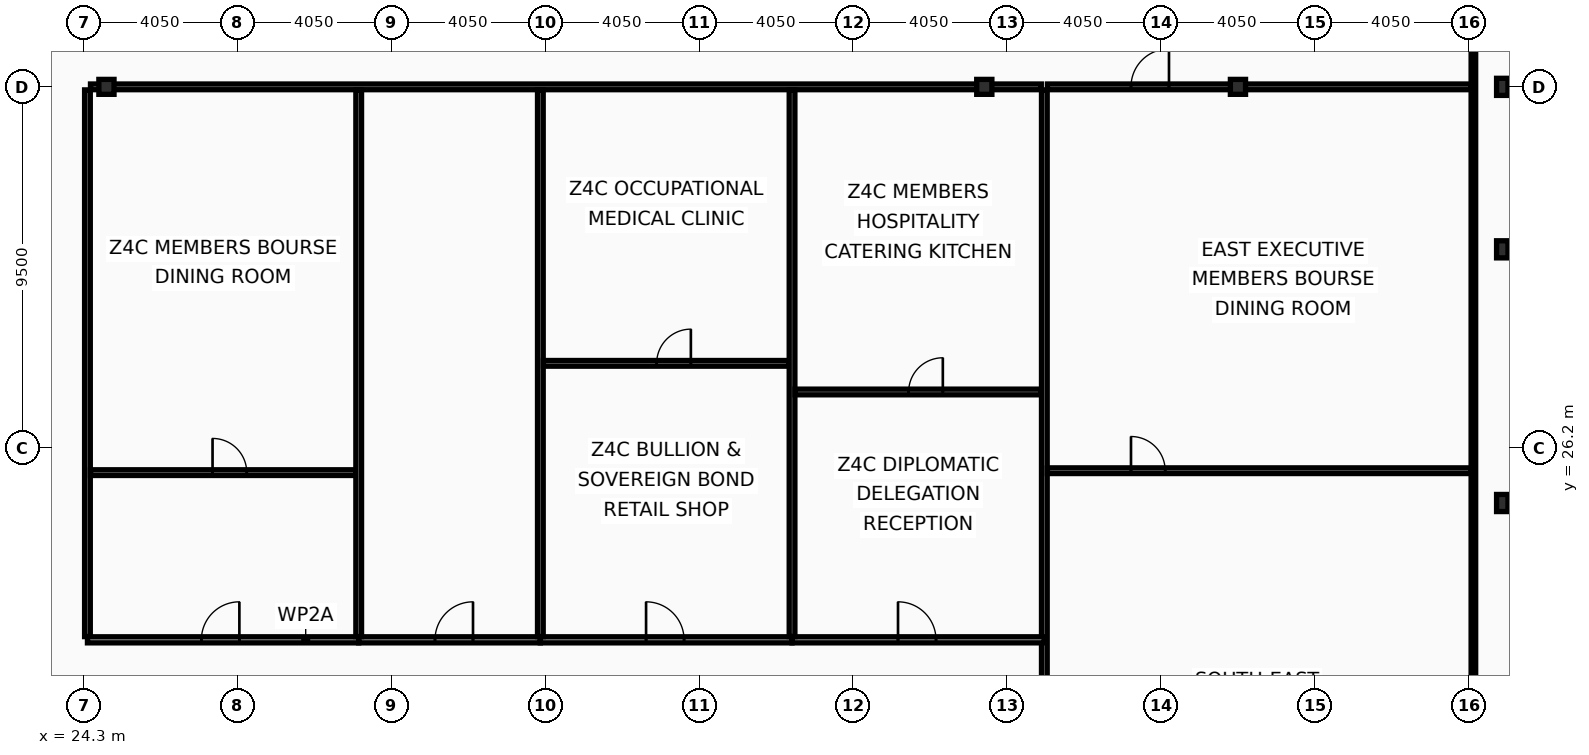
"""IFC4 building model, lengths in metres.
Left out: names, types, materials, properties, quantities, classifications, styles, units other than length and angle.
Written with IfcOpenShell. Run it as: python <this file> out.ifc"""

import sys

from ifc_helpers import new_model, si_unit, direction, frame, frame_2d, origin, origin_2d, place, context, subcontext, project, spatial, rectangle, i_section, extrude, element, fill, save


model = new_model("IFC4")
c1 = context("Model", 3, precision=1e-05, world=origin(), true_north=direction((0.0, 1.0)))
c2 = subcontext(c1, "Body", "Model", "MODEL_VIEW")
j1 = project(units=[si_unit("LENGTHUNIT", "METRE"), si_unit("PLANEANGLEUNIT", "RADIAN")], contexts=[c1])
p1 = place(None, origin())
s1 = spatial("IfcSite", under=j1, at=p1, CompositionType="ELEMENT")
p2 = place(p1, origin())
s2 = spatial("IfcBuilding", under=s1, at=p2, CompositionType="ELEMENT")
p3 = place(p2, frame((0.0, 0.0, 298.6)))
s3 = spatial("IfcBuildingStorey", under=s2, at=p3, CompositionType="ELEMENT", Elevation=298.6)
for number, where, z_axis, x_axis in (
    (1, (61.63, 24.75, 0.0), (0.0, 0.0, 1.0), (1.0, 0.0, 0.0)),
    (2, (61.63, 31.425, 0.0), (0.0, 0.0, 1.0), (1.0, 0.0, 0.0)),
    (3, (61.63, 35.7, 0.0), (0.0, 0.0, 1.0), (1.0, 0.0, 0.0)),
):
    element("IfcColumn", number, at=place(p3, frame(where, z_axis=z_axis, x_axis=x_axis)), inside=s3, PredefinedType="COLUMN", context=c2, shape_type="SweptSolid", body=[
        extrude(i_section(OverallWidth=0.3, OverallDepth=0.45, WebThickness=0.014, FlangeThickness=0.026, at=origin_2d()), origin(), (0.0, 0.0, 1.0), 3.6),
    ])
for number, where, z_axis, x_axis in (
    (4, (24.9, 35.7, 0.0), (0.0, 0.0, 1.0), (1.0, 0.0, 0.0)),
    (5, (48.0, 35.7, 0.0), (0.0, 0.0, 1.0), (1.0, 0.0, 0.0)),
    (6, (54.675, 35.7, 0.0), (0.0, 0.0, 1.0), (1.0, 0.0, 0.0)),
):
    element("IfcColumn", number, at=place(p3, frame(where, z_axis=z_axis, x_axis=x_axis)), inside=s3, PredefinedType="COLUMN", context=c2, shape_type="SweptSolid", body=[
        extrude(i_section(OverallWidth=0.399, OverallDepth=0.393, WebThickness=0.023, FlangeThickness=0.037, at=origin_2d()), origin(), (0.0, 0.0, 1.0), 3.6),
    ])
p4 = place(p3, frame((24.4, 21.235, 0.0), z_axis=(0.0, 0.0, 1.0), x_axis=(0.0, 1.0, 0.0)))
e7 = element("IfcWall", 7, at=p4, inside=s3, PredefinedType="PARTITIONING", context=c2, shape_type="SweptSolid", body=[
    extrude(rectangle(XDim=14.385, YDim=0.15, at=frame_2d((7.192, 0.0))), origin(), (0.0, 0.0, 1.0), 2.78),
])
p5 = place(p3, frame((49.58, 10.665, 0.0), z_axis=(0.0, 0.0, 1.0), x_axis=(0.0, 1.0, 0.0)))
e8 = element("IfcWall", 8, at=p5, inside=s3, PredefinedType="PARTITIONING", context=c2, shape_type="SweptSolid", body=[
    extrude(rectangle(XDim=24.955, YDim=0.15, at=frame_2d((12.478, 0.0))), origin(), (0.0, 0.0, 1.0), 3.03),
])
p6 = place(p5, frame((3.2, 0.0, 0.0)))
e9 = element("IfcOpeningElement", 9, at=p6, cuts=e8, PredefinedType="OPENING", context=c2, shape_type="SweptSolid", body=[
    extrude(rectangle(XDim=1.1, YDim=2.1, at=frame_2d((0.55, 1.05))), frame((0.0, 0.085, 0.0), z_axis=(0.0, -1.0, 0.0), x_axis=(1.0, 0.0, 0.0)), (0.0, 0.0, 1.0), 0.17),
])
p7 = place(p3, frame((24.48, 35.7, 0.0), z_axis=(0.0, 0.0, 1.0), x_axis=(1.0, 0.0, 0.0)))
e10 = element("IfcWall", 10, at=p7, inside=s3, PredefinedType="PARTITIONING", context=c2, shape_type="SweptSolid", body=[
    extrude(rectangle(XDim=25.02, YDim=0.15, at=frame_2d((12.51, 0.0))), origin(), (0.0, 0.0, 1.0), 2.78),
])
p8 = place(p3, frame((49.66, 35.7, 0.0), z_axis=(0.0, 0.0, 1.0), x_axis=(1.0, 0.0, 0.0)))
e11 = element("IfcWall", 11, at=p8, inside=s3, PredefinedType="PARTITIONING", context=c2, shape_type="SweptSolid", body=[
    extrude(rectangle(XDim=11.145, YDim=0.15, at=frame_2d((5.573, 0.0))), origin(), (0.0, 0.0, 1.0), 2.78),
])
p9 = place(p8, frame((2.2, 0.0, 0.0)))
e12 = element("IfcOpeningElement", 12, at=p9, cuts=e11, PredefinedType="OPENING", context=c2, shape_type="SweptSolid", body=[
    extrude(rectangle(XDim=1.0, YDim=2.05, at=frame_2d((0.5, 1.025))), frame((0.0, 0.085, 0.0), z_axis=(0.0, -1.0, 0.0), x_axis=(1.0, 0.0, 0.0)), (0.0, 0.0, 1.0), 0.17),
])
p10 = place(p3, frame((49.66, 25.6, 0.0), z_axis=(0.0, 0.0, 1.0), x_axis=(1.0, 0.0, 0.0)))
e13 = element("IfcWall", 13, at=p10, inside=s3, PredefinedType="PARTITIONING", context=c2, shape_type="SweptSolid", body=[
    extrude(rectangle(XDim=11.145, YDim=0.15, at=frame_2d((5.573, 0.0))), origin(), (0.0, 0.0, 1.0), 2.78),
])
p11 = place(p10, frame((2.2, 0.0, 0.0)))
e14 = element("IfcOpeningElement", 14, at=p11, cuts=e13, PredefinedType="OPENING", context=c2, shape_type="SweptSolid", body=[
    extrude(rectangle(XDim=0.9, YDim=2.05, at=frame_2d((0.45, 1.025))), frame((0.0, 0.085, 0.0), z_axis=(0.0, -1.0, 0.0), x_axis=(1.0, 0.0, 0.0)), (0.0, 0.0, 1.0), 0.17),
])
p12 = place(p3, frame((24.4, 21.15, 0.0), z_axis=(0.0, 0.0, 1.0), x_axis=(1.0, 0.0, 0.0)))
e15 = element("IfcWall", 15, at=p12, inside=s3, PredefinedType="PARTITIONING", context=c2, shape_type="SweptSolid", body=[
    extrude(rectangle(XDim=7.138, YDim=0.16, at=frame_2d((3.569, 0.0))), origin(), (0.0, 0.0, 1.0), 2.78),
])
p13 = place(p12, frame((2.998, 0.0, 0.0)))
e16 = element("IfcOpeningElement", 16, at=p13, cuts=e15, PredefinedType="OPENING", context=c2, shape_type="SweptSolid", body=[
    extrude(rectangle(XDim=1.0, YDim=2.05, at=frame_2d((0.5, 1.025))), frame((0.0, 0.09, 0.0), z_axis=(0.0, -1.0, 0.0), x_axis=(1.0, 0.0, 0.0)), (0.0, 0.0, 1.0), 0.18),
])
p14 = place(p3, frame((24.48, 25.55, 0.0), z_axis=(0.0, 0.0, 1.0), x_axis=(1.0, 0.0, 0.0)))
e17 = element("IfcWall", 17, at=p14, inside=s3, PredefinedType="PARTITIONING", context=c2, shape_type="SweptSolid", body=[
    extrude(rectangle(XDim=6.978, YDim=0.15, at=frame_2d((3.489, 0.0))), origin(), (0.0, 0.0, 1.0), 2.78),
])
p15 = place(p14, frame((3.212, 0.0, 0.0)))
e18 = element("IfcOpeningElement", 18, at=p15, cuts=e17, PredefinedType="OPENING", context=c2, shape_type="SweptSolid", body=[
    extrude(rectangle(XDim=0.9, YDim=2.05, at=frame_2d((0.45, 1.025))), frame((0.0, 0.085, 0.0), z_axis=(0.0, -1.0, 0.0), x_axis=(1.0, 0.0, 0.0)), (0.0, 0.0, 1.0), 0.17),
])
p16 = place(p3, frame((31.538, 21.15, 0.0), z_axis=(0.0, 0.0, 1.0), x_axis=(1.0, 0.0, 0.0)))
e19 = element("IfcWall", 19, at=p16, inside=s3, PredefinedType="PARTITIONING", context=c2, shape_type="SweptSolid", body=[
    extrude(rectangle(XDim=4.78, YDim=0.16, at=frame_2d((2.39, 0.0))), origin(), (0.0, 0.0, 1.0), 3.44),
])
p17 = place(p16, frame((2.008, 0.0, 0.0)))
e20 = element("IfcOpeningElement", 20, at=p17, cuts=e19, PredefinedType="OPENING", context=c2, shape_type="SweptSolid", body=[
    extrude(rectangle(XDim=1.0, YDim=2.05, at=frame_2d((0.5, 1.025))), frame((0.0, 0.09, 0.0), z_axis=(0.0, -1.0, 0.0), x_axis=(1.0, 0.0, 0.0)), (0.0, 0.0, 1.0), 0.18),
])
p18 = place(p3, frame((31.538, 21.235, 0.0), z_axis=(0.0, 0.0, 1.0), x_axis=(0.0, 1.0, 0.0)))
e21 = element("IfcWall", 21, at=p18, inside=s3, PredefinedType="PARTITIONING", context=c2, shape_type="SweptSolid", body=[
    extrude(rectangle(XDim=14.385, YDim=0.15, at=frame_2d((7.192, 0.0))), origin(), (0.0, 0.0, 1.0), 3.03),
])
p19 = place(p3, frame((36.318, 21.15, 0.0), z_axis=(0.0, 0.0, 1.0), x_axis=(1.0, 0.0, 0.0)))
e22 = element("IfcWall", 22, at=p19, inside=s3, PredefinedType="PARTITIONING", context=c2, shape_type="SweptSolid", body=[
    extrude(rectangle(XDim=6.623, YDim=0.16, at=frame_2d((3.312, 0.0))), origin(), (0.0, 0.0, 1.0), 2.78),
])
p20 = place(p19, frame((2.782, 0.0, 0.0)))
e23 = element("IfcOpeningElement", 23, at=p20, cuts=e22, PredefinedType="OPENING", context=c2, shape_type="SweptSolid", body=[
    extrude(rectangle(XDim=1.0, YDim=2.05, at=frame_2d((0.5, 1.025))), frame((0.0, 0.09, 0.0), z_axis=(0.0, -1.0, 0.0), x_axis=(1.0, 0.0, 0.0)), (0.0, 0.0, 1.0), 0.18),
])
p21 = place(p3, frame((36.318, 21.235, 0.0), z_axis=(0.0, 0.0, 1.0), x_axis=(0.0, 1.0, 0.0)))
e24 = element("IfcWall", 24, at=p21, inside=s3, PredefinedType="PARTITIONING", context=c2, shape_type="SweptSolid", body=[
    extrude(rectangle(XDim=14.385, YDim=0.15, at=frame_2d((7.192, 0.0))), origin(), (0.0, 0.0, 1.0), 3.03),
])
p22 = place(p3, frame((36.398, 28.425, 0.0), z_axis=(0.0, 0.0, 1.0), x_axis=(1.0, 0.0, 0.0)))
e25 = element("IfcWall", 25, at=p22, inside=s3, PredefinedType="PARTITIONING", context=c2, shape_type="SweptSolid", body=[
    extrude(rectangle(XDim=6.463, YDim=0.15, at=frame_2d((3.231, 0.0))), origin(), (0.0, 0.0, 1.0), 2.78),
])
p23 = place(p22, frame((2.98, 0.0, 0.0)))
e26 = element("IfcOpeningElement", 26, at=p23, cuts=e25, PredefinedType="OPENING", context=c2, shape_type="SweptSolid", body=[
    extrude(rectangle(XDim=0.9, YDim=2.05, at=frame_2d((0.45, 1.025))), frame((0.0, 0.085, 0.0), z_axis=(0.0, -1.0, 0.0), x_axis=(1.0, 0.0, 0.0)), (0.0, 0.0, 1.0), 0.17),
])
p24 = place(p3, frame((42.941, 21.15, 0.0), z_axis=(0.0, 0.0, 1.0), x_axis=(1.0, 0.0, 0.0)))
e27 = element("IfcWall", 27, at=p24, inside=s3, PredefinedType="PARTITIONING", context=c2, shape_type="SweptSolid", body=[
    extrude(rectangle(XDim=6.639, YDim=0.16, at=frame_2d((3.319, 0.0))), origin(), (0.0, 0.0, 1.0), 2.78),
])
p25 = place(p24, frame((2.788, 0.0, 0.0)))
e28 = element("IfcOpeningElement", 28, at=p25, cuts=e27, PredefinedType="OPENING", context=c2, shape_type="SweptSolid", body=[
    extrude(rectangle(XDim=1.0, YDim=2.05, at=frame_2d((0.5, 1.025))), frame((0.0, 0.09, 0.0), z_axis=(0.0, -1.0, 0.0), x_axis=(1.0, 0.0, 0.0)), (0.0, 0.0, 1.0), 0.18),
])
p26 = place(p3, frame((42.941, 21.235, 0.0), z_axis=(0.0, 0.0, 1.0), x_axis=(0.0, 1.0, 0.0)))
e29 = element("IfcWall", 29, at=p26, inside=s3, PredefinedType="PARTITIONING", context=c2, shape_type="SweptSolid", body=[
    extrude(rectangle(XDim=14.385, YDim=0.15, at=frame_2d((7.192, 0.0))), origin(), (0.0, 0.0, 1.0), 2.78),
])
p27 = place(p3, frame((43.021, 27.672, 0.0), z_axis=(0.0, 0.0, 1.0), x_axis=(1.0, 0.0, 0.0)))
e30 = element("IfcWall", 30, at=p27, inside=s3, PredefinedType="PARTITIONING", context=c2, shape_type="SweptSolid", body=[
    extrude(rectangle(XDim=6.479, YDim=0.15, at=frame_2d((3.24, 0.0))), origin(), (0.0, 0.0, 1.0), 2.78),
])
p28 = place(p27, frame((2.988, 0.0, 0.0)))
e31 = element("IfcOpeningElement", 31, at=p28, cuts=e30, PredefinedType="OPENING", context=c2, shape_type="SweptSolid", body=[
    extrude(rectangle(XDim=0.9, YDim=2.05, at=frame_2d((0.45, 1.025))), frame((0.0, 0.085, 0.0), z_axis=(0.0, -1.0, 0.0), x_axis=(1.0, 0.0, 0.0)), (0.0, 0.0, 1.0), 0.17),
])
p29 = place(p3, frame((60.87, 10.665, 0.0), z_axis=(0.0, 0.0, 1.0), x_axis=(0.0, 1.0, 0.0)))
e32 = element("IfcWall", 32, at=p29, inside=s3, PredefinedType="PARTITIONING", context=c2, shape_type="SweptSolid", body=[
    extrude(rectangle(XDim=42.11, YDim=0.12, at=frame_2d((21.055, 0.0))), origin(), (0.0, 0.0, 1.0), 2.78),
])
p30 = place(p9, origin())
e33 = element("IfcDoor", 33, at=p30, inside=s3, OperationType="SINGLE_SWING_RIGHT", PredefinedType="DOOR", context=c2, shape_type="SweptSolid", body=[
    extrude(rectangle(XDim=1.0, YDim=2.05, at=frame_2d((0.5, 1.025))), frame((0.0, 0.025, 0.0), z_axis=(0.0, -1.0, 0.0), x_axis=(1.0, 0.0, 0.0)), (0.0, 0.0, 1.0), 0.05),
])
fill(e12, e33)
p31 = place(p11, origin())
e34 = element("IfcDoor", 34, at=p31, inside=s3, OperationType="SINGLE_SWING_LEFT", PredefinedType="DOOR", context=c2, shape_type="SweptSolid", body=[
    extrude(rectangle(XDim=0.9, YDim=2.05, at=frame_2d((0.45, 1.025))), frame((0.0, 0.025, 0.0), z_axis=(0.0, -1.0, 0.0), x_axis=(1.0, 0.0, 0.0)), (0.0, 0.0, 1.0), 0.05),
])
fill(e14, e34)
p32 = place(p13, origin())
e35 = element("IfcDoor", 35, at=p32, inside=s3, OperationType="SINGLE_SWING_RIGHT", PredefinedType="DOOR", context=c2, shape_type="SweptSolid", body=[
    extrude(rectangle(XDim=1.0, YDim=2.05, at=frame_2d((0.5, 1.025))), frame((0.0, 0.025, 0.0), z_axis=(0.0, -1.0, 0.0), x_axis=(1.0, 0.0, 0.0)), (0.0, 0.0, 1.0), 0.05),
])
fill(e16, e35)
p33 = place(p15, origin())
e36 = element("IfcDoor", 36, at=p33, inside=s3, OperationType="SINGLE_SWING_LEFT", PredefinedType="DOOR", context=c2, shape_type="SweptSolid", body=[
    extrude(rectangle(XDim=0.9, YDim=2.05, at=frame_2d((0.45, 1.025))), frame((0.0, 0.025, 0.0), z_axis=(0.0, -1.0, 0.0), x_axis=(1.0, 0.0, 0.0)), (0.0, 0.0, 1.0), 0.05),
])
fill(e18, e36)
p34 = place(p17, origin())
e37 = element("IfcDoor", 37, at=p34, inside=s3, OperationType="SINGLE_SWING_RIGHT", PredefinedType="DOOR", context=c2, shape_type="SweptSolid", body=[
    extrude(rectangle(XDim=1.0, YDim=2.05, at=frame_2d((0.5, 1.025))), frame((0.0, 0.025, 0.0), z_axis=(0.0, -1.0, 0.0), x_axis=(1.0, 0.0, 0.0)), (0.0, 0.0, 1.0), 0.05),
])
fill(e20, e37)
p35 = place(p20, origin())
e38 = element("IfcDoor", 38, at=p35, inside=s3, OperationType="SINGLE_SWING_LEFT", PredefinedType="DOOR", context=c2, shape_type="SweptSolid", body=[
    extrude(rectangle(XDim=1.0, YDim=2.05, at=frame_2d((0.5, 1.025))), frame((0.0, 0.025, 0.0), z_axis=(0.0, -1.0, 0.0), x_axis=(1.0, 0.0, 0.0)), (0.0, 0.0, 1.0), 0.05),
])
fill(e23, e38)
p36 = place(p23, origin())
e39 = element("IfcDoor", 39, at=p36, inside=s3, OperationType="SINGLE_SWING_RIGHT", PredefinedType="DOOR", context=c2, shape_type="SweptSolid", body=[
    extrude(rectangle(XDim=0.9, YDim=2.05, at=frame_2d((0.45, 1.025))), frame((0.0, 0.025, 0.0), z_axis=(0.0, -1.0, 0.0), x_axis=(1.0, 0.0, 0.0)), (0.0, 0.0, 1.0), 0.05),
])
fill(e26, e39)
p37 = place(p25, origin())
e40 = element("IfcDoor", 40, at=p37, inside=s3, OperationType="SINGLE_SWING_LEFT", PredefinedType="DOOR", context=c2, shape_type="SweptSolid", body=[
    extrude(rectangle(XDim=1.0, YDim=2.05, at=frame_2d((0.5, 1.025))), frame((0.0, 0.025, 0.0), z_axis=(0.0, -1.0, 0.0), x_axis=(1.0, 0.0, 0.0)), (0.0, 0.0, 1.0), 0.05),
])
fill(e28, e40)
p38 = place(p28, origin())
e41 = element("IfcDoor", 41, at=p38, inside=s3, OperationType="SINGLE_SWING_RIGHT", PredefinedType="DOOR", context=c2, shape_type="SweptSolid", body=[
    extrude(rectangle(XDim=0.9, YDim=2.05, at=frame_2d((0.45, 1.025))), frame((0.0, 0.025, 0.0), z_axis=(0.0, -1.0, 0.0), x_axis=(1.0, 0.0, 0.0)), (0.0, 0.0, 1.0), 0.05),
])
fill(e31, e41)
save(model, sys.argv[1])
